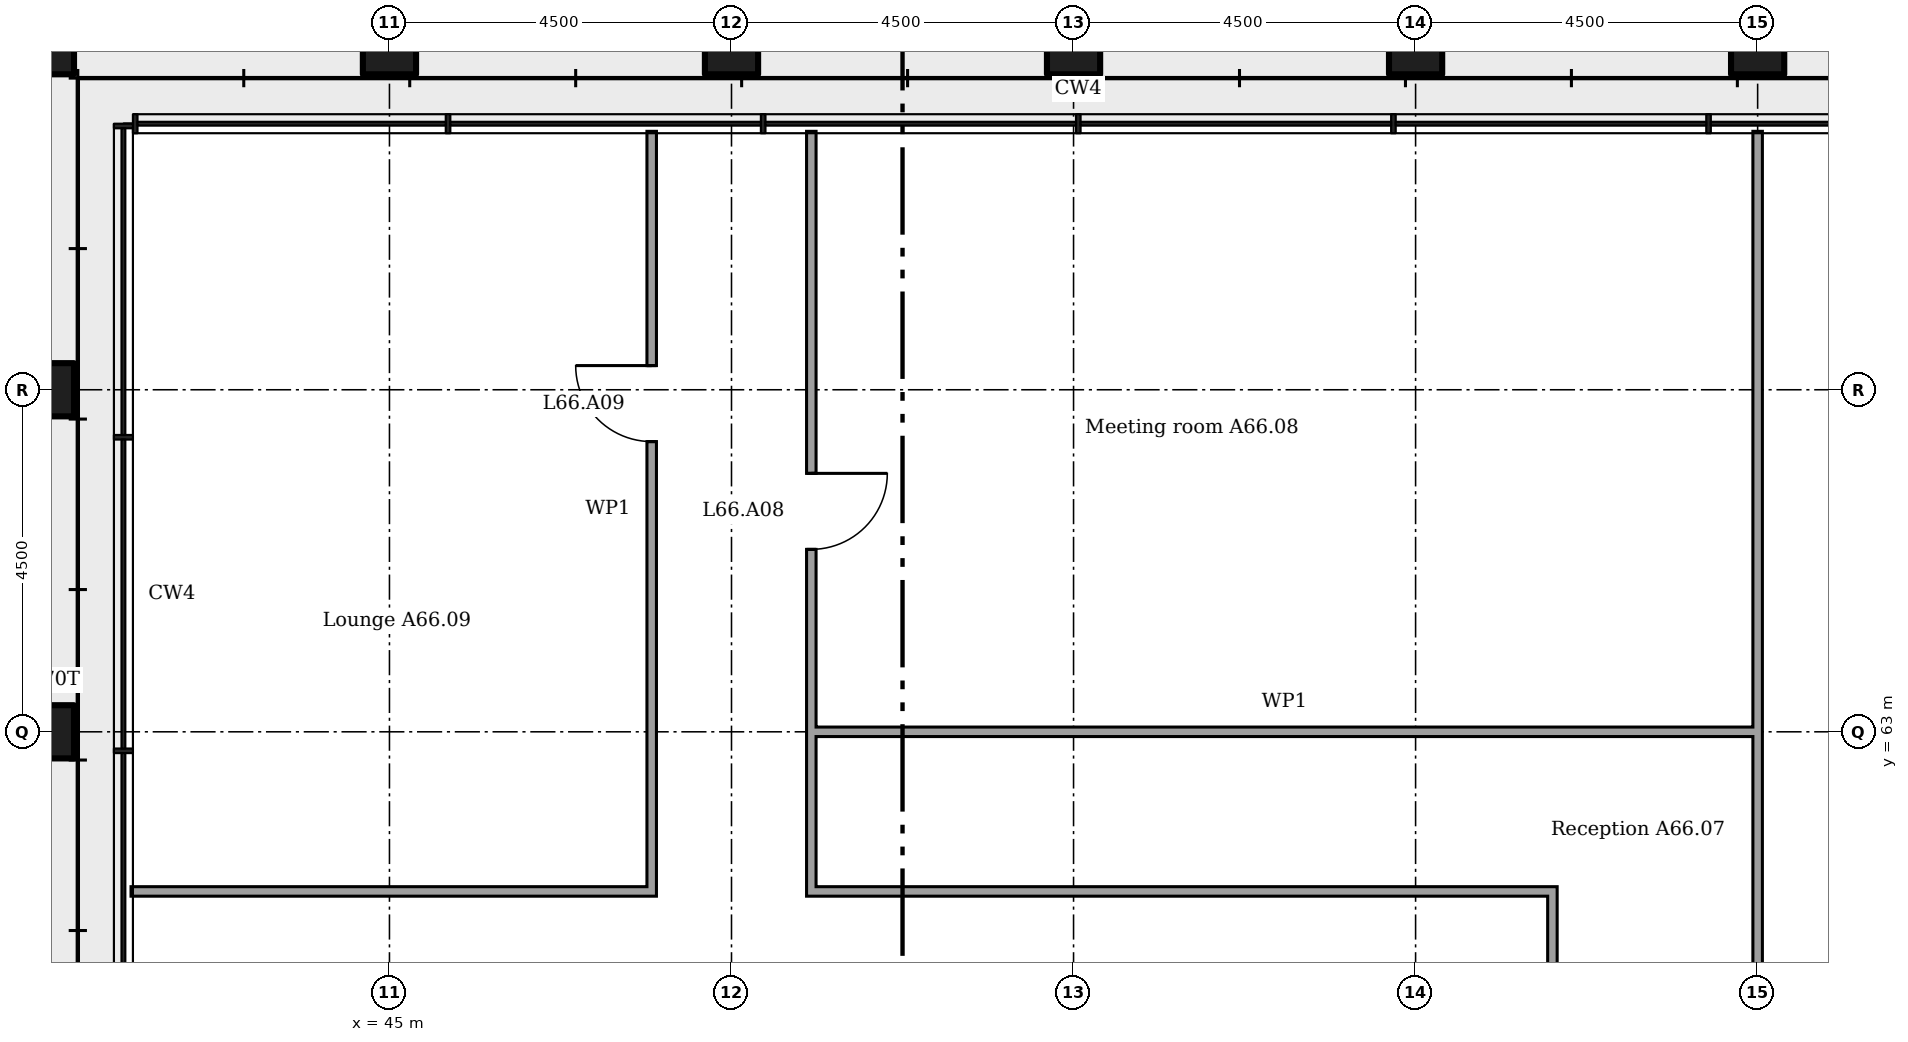
"""IFC4 building model, lengths in metres.
Left out: names, types, materials, properties, quantities, classifications, styles, units other than length and angle.
Written with IfcOpenShell. Run it as: python <this file> out.ifc"""

import sys

from ifc_helpers import new_model, si_unit, direction, frame, frame_2d, origin, origin_2d, place, context, subcontext, project, spatial, rectangle, extrude, element, fill, save


model = new_model("IFC4")
c1 = context("Model", 3, precision=1e-05, world=origin(), true_north=direction((0.0, 1.0)))
c2 = subcontext(c1, "Body", "Model", "MODEL_VIEW")
j1 = project(units=[si_unit("LENGTHUNIT", "METRE"), si_unit("PLANEANGLEUNIT", "RADIAN")], contexts=[c1])
p1 = place(None, origin())
s1 = spatial("IfcSite", under=j1, at=p1, CompositionType="ELEMENT")
p2 = place(p1, origin())
s2 = spatial("IfcBuilding", under=s1, at=p2, CompositionType="ELEMENT")
p3 = place(p2, frame((0.0, 0.0, 259.4)))
s3 = spatial("IfcBuildingStorey", under=s2, at=p3, CompositionType="ELEMENT", Elevation=259.4)
for number, where in (
    (1, (63.0, 72.0, 0.0)),
    (2, (58.5, 72.0, 0.0)),
    (3, (54.0, 72.0, 0.0)),
    (4, (49.5, 72.0, 0.0)),
    (5, (45.0, 72.0, 0.0)),
    (6, (40.5, 72.0, 0.0)),
    (7, (40.5, 67.5, 0.0)),
    (8, (40.5, 63.0, 0.0)),
):
    element("IfcColumn", number, at=place(p3, frame(where)), inside=s3, PredefinedType="COLUMN", context=c2, shape_type="SweptSolid", body=[
        extrude(rectangle(XDim=0.7, YDim=0.7, at=origin_2d()), origin(), (0.0, 0.0, 1.0), 4.2),
    ])
p4 = place(p3, frame((41.6, 60.9, 0.0)))
e9 = element("IfcWall", 9, at=p4, inside=s3, PredefinedType="PARTITIONING", context=c2, shape_type="SweptSolid", body=[
    extrude(rectangle(XDim=6.912, YDim=0.125, at=frame_2d((3.456, 0.0))), origin(), (0.0, 0.0, 1.0), 4.025),
])
p5 = place(p3, frame((50.488, 60.9, 0.0)))
e10 = element("IfcWall", 10, at=p5, inside=s3, PredefinedType="PARTITIONING", context=c2, shape_type="SweptSolid", body=[
    extrude(rectangle(XDim=9.875, YDim=0.125, at=frame_2d((4.938, 0.0))), origin(), (0.0, 0.0, 1.0), 4.025),
])
p6 = place(p3, frame((50.55, 63.0, 0.0)))
e11 = element("IfcWall", 11, at=p6, inside=s3, PredefinedType="PARTITIONING", context=c2, shape_type="SweptSolid", body=[
    extrude(rectangle(XDim=12.45, YDim=0.125, at=frame_2d((6.225, 0.0))), origin(), (0.0, 0.0, 1.0), 4.025),
])
p7 = place(p3, frame((48.45, 60.962, 0.0), z_axis=(0.0, 0.0, 1.0), x_axis=(0.0, 1.0, 0.0)))
e12 = element("IfcWall", 12, at=p7, inside=s3, PredefinedType="PARTITIONING", context=c2, shape_type="SweptSolid", body=[
    extrude(rectangle(XDim=9.938, YDim=0.125, at=frame_2d((4.969, 0.0))), origin(), (0.0, 0.0, 1.0), 4.025),
])
p8 = place(p7, frame((5.855, 0.0, 0.0)))
e13 = element("IfcOpeningElement", 13, at=p8, cuts=e12, PredefinedType="OPENING", context=c2, shape_type="SweptSolid", body=[
    extrude(rectangle(XDim=1.0, YDim=2.1, at=frame_2d((0.5, 1.05))), frame((0.0, 0.073, 0.0), z_axis=(0.0, -1.0, 0.0), x_axis=(1.0, 0.0, 0.0)), (0.0, 0.0, 1.0), 0.145),
])
p9 = place(p3, frame((50.55, 60.962, 0.0), z_axis=(0.0, 0.0, 1.0), x_axis=(0.0, 1.0, 0.0)))
e14 = element("IfcWall", 14, at=p9, inside=s3, PredefinedType="PARTITIONING", context=c2, shape_type="SweptSolid", body=[
    extrude(rectangle(XDim=9.938, YDim=0.125, at=frame_2d((4.969, 0.0))), origin(), (0.0, 0.0, 1.0), 4.025),
])
p10 = place(p9, frame((4.438, 0.0, 0.0)))
e15 = element("IfcOpeningElement", 15, at=p10, cuts=e14, PredefinedType="OPENING", context=c2, shape_type="SweptSolid", body=[
    extrude(rectangle(XDim=1.0, YDim=2.1, at=frame_2d((0.5, 1.05))), frame((0.0, 0.073, 0.0), z_axis=(0.0, -1.0, 0.0), x_axis=(1.0, 0.0, 0.0)), (0.0, 0.0, 1.0), 0.145),
])
p11 = place(p3, frame((60.3, 50.613, 0.0), z_axis=(0.0, 0.0, 1.0), x_axis=(0.0, 1.0, 0.0)))
e16 = element("IfcWall", 16, at=p11, inside=s3, PredefinedType="PARTITIONING", context=c2, shape_type="SweptSolid", body=[
    extrude(rectangle(XDim=10.225, YDim=0.125, at=frame_2d((5.112, 0.0))), origin(), (0.0, 0.0, 1.0), 4.025),
])
p12 = place(p11, frame((4.613, 0.0, 0.0)))
e17 = element("IfcOpeningElement", 17, at=p12, cuts=e16, PredefinedType="OPENING", context=c2, shape_type="SweptSolid", body=[
    extrude(rectangle(XDim=1.0, YDim=2.1, at=frame_2d((0.5, 1.05))), frame((0.0, 0.073, 0.0), z_axis=(0.0, -1.0, 0.0), x_axis=(1.0, 0.0, 0.0)), (0.0, 0.0, 1.0), 0.145),
])
p13 = place(p3, frame((63.0, 58.775, 0.0), z_axis=(0.0, 0.0, 1.0), x_axis=(0.0, 1.0, 0.0)))
e18 = element("IfcWall", 18, at=p13, inside=s3, PredefinedType="PARTITIONING", context=c2, shape_type="SweptSolid", body=[
    extrude(rectangle(XDim=12.125, YDim=0.125, at=frame_2d((6.062, 0.0))), origin(), (0.0, 0.0, 1.0), 3.341),
])
p14 = place(p10, frame((1.0, 0.0, 0.0), x_axis=(-1.0, 0.0, 0.0)))
e19 = element("IfcDoor", 19, at=p14, inside=s3, OperationType="SINGLE_SWING_RIGHT", PredefinedType="DOOR", context=c2, shape_type="SweptSolid", body=[
    extrude(rectangle(XDim=1.0, YDim=2.1, at=frame_2d((0.5, 1.05))), frame((0.0, 0.025, 0.0), z_axis=(0.0, -1.0, 0.0), x_axis=(1.0, 0.0, 0.0)), (0.0, 0.0, 1.0), 0.05),
])
fill(e15, e19)
p15 = place(p8, origin())
e20 = element("IfcDoor", 20, at=p15, inside=s3, OperationType="SINGLE_SWING_LEFT", PredefinedType="DOOR", context=c2, shape_type="SweptSolid", body=[
    extrude(rectangle(XDim=1.0, YDim=2.1, at=frame_2d((0.5, 1.05))), frame((0.0, 0.025, 0.0), z_axis=(0.0, -1.0, 0.0), x_axis=(1.0, 0.0, 0.0)), (0.0, 0.0, 1.0), 0.05),
])
fill(e13, e20)
save(model, sys.argv[1])
